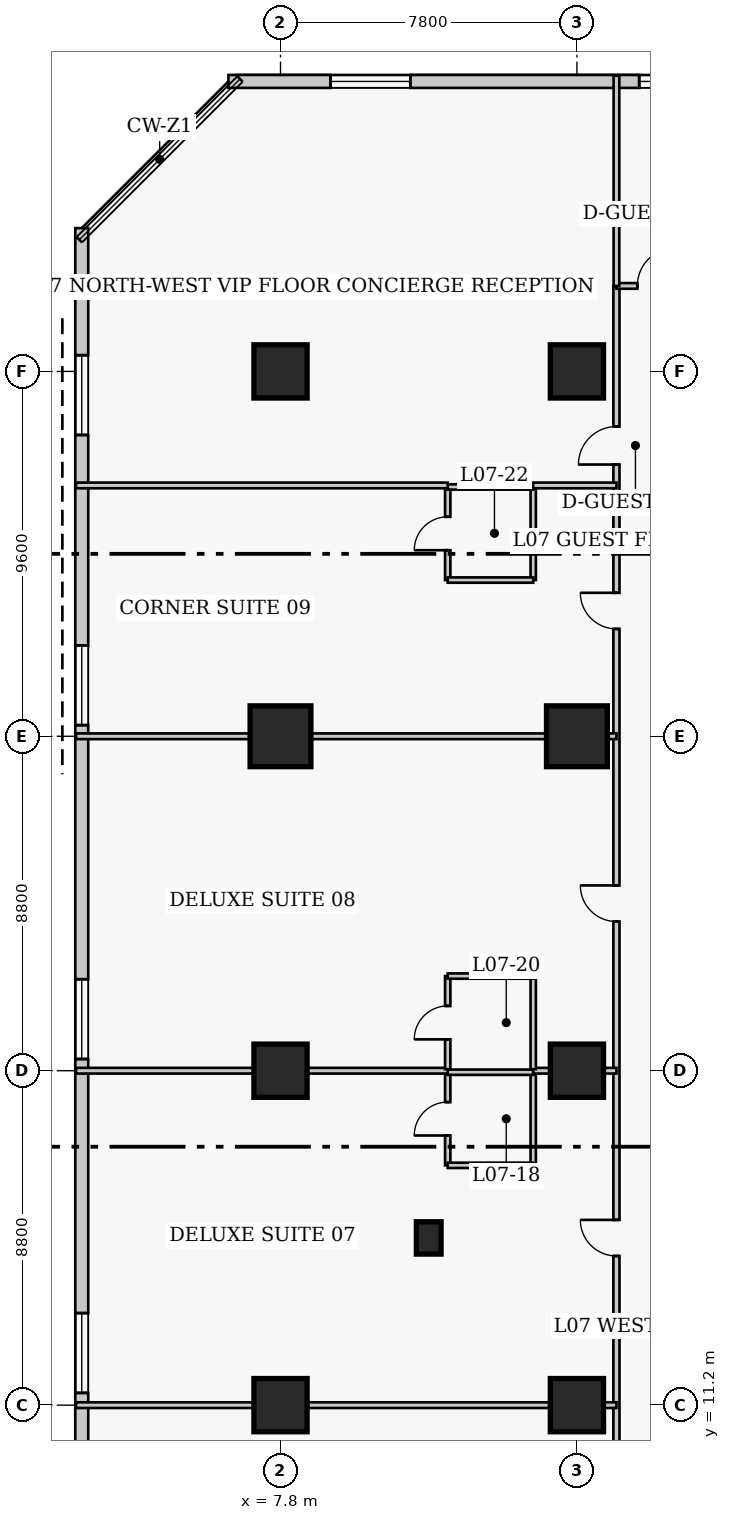
"""IFC4 building model, lengths in metres.
Left out: names, types, materials, properties, quantities, classifications, styles, units other than length and angle.
Written with IfcOpenShell. Run it as: python <this file> out.ifc"""

import sys

from ifc_helpers import new_model, si_unit, direction, frame, frame_2d, origin, origin_2d, place, context, subcontext, project, spatial, rectangle, extrude, element, fill, save


model = new_model("IFC4")
c1 = context("Model", 3, precision=1e-05, world=origin(), true_north=direction((0.0, 1.0)))
c2 = subcontext(c1, "Body", "Model", "MODEL_VIEW")
j1 = project(units=[si_unit("LENGTHUNIT", "METRE"), si_unit("PLANEANGLEUNIT", "RADIAN")], contexts=[c1])
p1 = place(None, origin())
s1 = spatial("IfcSite", under=j1, at=p1, CompositionType="ELEMENT")
p2 = place(p1, origin())
s2 = spatial("IfcBuilding", under=s1, at=p2, CompositionType="ELEMENT")
p3 = place(p2, frame((0.0, 0.0, 33.6)))
s3 = spatial("IfcBuildingStorey", under=s2, at=p3, CompositionType="ELEMENT", Elevation=33.6)
for number, where, z_axis, x_axis in (
    (1, (7.8, 11.2, 0.0), (0.0, 0.0, 1.0), (1.0, 0.0, 0.0)),
    (2, (7.8, 20.0, 0.0), (0.0, 0.0, 1.0), (1.0, 0.0, 0.0)),
):
    element("IfcColumn", number, at=place(p3, frame(where, z_axis=z_axis, x_axis=x_axis)), inside=s3, PredefinedType="COLUMN", context=c2, shape_type="SweptSolid", body=[
        extrude(rectangle(XDim=1.4, YDim=1.4, at=origin_2d()), origin(), (0.0, 0.0, 1.0), 3.8),
    ])
p4 = place(p3, frame((7.8, 28.8, 0.0), z_axis=(0.0, 0.0, 1.0), x_axis=(1.0, 0.0, 0.0)))
e3 = element("IfcColumn", 3, at=p4, inside=s3, PredefinedType="COLUMN", context=c2, shape_type="SweptSolid", body=[
    extrude(rectangle(XDim=1.6, YDim=1.6, at=origin_2d()), origin(), (0.0, 0.0, 1.0), 3.8),
])
for number, where, z_axis, x_axis in (
    (4, (7.8, 38.4, 0.0), (0.0, 0.0, 1.0), (1.0, 0.0, 0.0)),
    (5, (15.6, 11.2, 0.0), (0.0, 0.0, 1.0), (1.0, 0.0, 0.0)),
    (6, (15.6, 20.0, 0.0), (0.0, 0.0, 1.0), (1.0, 0.0, 0.0)),
):
    element("IfcColumn", number, at=place(p3, frame(where, z_axis=z_axis, x_axis=x_axis)), inside=s3, PredefinedType="COLUMN", context=c2, shape_type="SweptSolid", body=[
        extrude(rectangle(XDim=1.4, YDim=1.4, at=origin_2d()), origin(), (0.0, 0.0, 1.0), 3.8),
    ])
p5 = place(p3, frame((15.6, 28.8, 0.0), z_axis=(0.0, 0.0, 1.0), x_axis=(1.0, 0.0, 0.0)))
e7 = element("IfcColumn", 7, at=p5, inside=s3, PredefinedType="COLUMN", context=c2, shape_type="SweptSolid", body=[
    extrude(rectangle(XDim=1.6, YDim=1.6, at=origin_2d()), origin(), (0.0, 0.0, 1.0), 3.8),
])
p6 = place(p3, frame((15.6, 38.4, 0.0), z_axis=(0.0, 0.0, 1.0), x_axis=(1.0, 0.0, 0.0)))
e8 = element("IfcColumn", 8, at=p6, inside=s3, PredefinedType="COLUMN", context=c2, shape_type="SweptSolid", body=[
    extrude(rectangle(XDim=1.4, YDim=1.4, at=origin_2d()), origin(), (0.0, 0.0, 1.0), 3.8),
])
p7 = place(p3, frame((11.7, 15.6, 0.0), z_axis=(0.0, 0.0, 1.0), x_axis=(1.0, 0.0, 0.0)))
e9 = element("IfcColumn", 9, at=p7, inside=s3, PredefinedType="PILASTER", context=c2, shape_type="SweptSolid", body=[
    extrude(rectangle(XDim=0.65, YDim=0.85, at=origin_2d()), origin(), (0.0, 0.0, 1.0), 3.8),
])
p8 = place(p3, frame((36.32, 46.03, 0.0), z_axis=(0.0, 0.0, 1.0), x_axis=(-1.0, 0.0, 0.0)))
e10 = element("IfcWall", 10, at=p8, inside=s3, PredefinedType="SOLIDWALL", context=c2, shape_type="SweptSolid", body=[
    extrude(rectangle(XDim=29.89, YDim=0.34, at=frame_2d((14.945, 0.0))), origin(), (0.0, 0.0, 1.0), 3.54),
])
p9 = place(p8, frame((2.686, 0.0, 0.85)))
e11 = element("IfcOpeningElement", 11, at=p9, cuts=e10, PredefinedType="OPENING", context=c2, shape_type="SweptSolid", body=[
    extrude(rectangle(XDim=2.1, YDim=1.85, at=frame_2d((1.05, 0.925))), frame((0.0, 0.18, 0.0), z_axis=(0.0, -1.0, 0.0), x_axis=(1.0, 0.0, 0.0)), (0.0, 0.0, 1.0), 0.36),
])
p10 = place(p8, frame((10.159, 0.0, 0.85)))
e12 = element("IfcOpeningElement", 12, at=p10, cuts=e10, PredefinedType="OPENING", context=c2, shape_type="SweptSolid", body=[
    extrude(rectangle(XDim=2.1, YDim=1.85, at=frame_2d((1.05, 0.925))), frame((0.0, 0.18, 0.0), z_axis=(0.0, -1.0, 0.0), x_axis=(1.0, 0.0, 0.0)), (0.0, 0.0, 1.0), 0.36),
])
p11 = place(p8, frame((16.981, 0.0, 0.85)))
e13 = element("IfcOpeningElement", 13, at=p11, cuts=e10, PredefinedType="OPENING", context=c2, shape_type="SweptSolid", body=[
    extrude(rectangle(XDim=2.1, YDim=1.85, at=frame_2d((1.05, 0.925))), frame((0.0, 0.18, 0.0), z_axis=(0.0, -1.0, 0.0), x_axis=(1.0, 0.0, 0.0)), (0.0, 0.0, 1.0), 0.36),
])
p12 = place(p8, frame((25.104, 0.0, 0.85)))
e14 = element("IfcOpeningElement", 14, at=p12, cuts=e10, PredefinedType="OPENING", context=c2, shape_type="SweptSolid", body=[
    extrude(rectangle(XDim=2.1, YDim=1.85, at=frame_2d((1.05, 0.925))), frame((0.0, 0.18, 0.0), z_axis=(0.0, -1.0, 0.0), x_axis=(1.0, 0.0, 0.0)), (0.0, 0.0, 1.0), 0.36),
])
p13 = place(p3, frame((2.57, 42.17, 0.0), z_axis=(0.0, 0.0, 1.0), x_axis=(0.0, -1.0, 0.0)))
e15 = element("IfcWall", 15, at=p13, inside=s3, PredefinedType="SOLIDWALL", context=c2, shape_type="SweptSolid", body=[
    extrude(rectangle(XDim=35.14, YDim=0.34, at=frame_2d((17.57, 0.0))), origin(), (0.0, 0.0, 1.0), 3.54),
])
p14 = place(p13, frame((3.343, 0.0, 0.85)))
e16 = element("IfcOpeningElement", 16, at=p14, cuts=e15, PredefinedType="OPENING", context=c2, shape_type="SweptSolid", body=[
    extrude(rectangle(XDim=2.1, YDim=1.85, at=frame_2d((1.05, 0.925))), frame((0.0, 0.18, 0.0), z_axis=(0.0, -1.0, 0.0), x_axis=(1.0, 0.0, 0.0)), (0.0, 0.0, 1.0), 0.36),
])
p15 = place(p13, frame((10.978, 0.0, 0.85)))
e17 = element("IfcOpeningElement", 17, at=p15, cuts=e15, PredefinedType="OPENING", context=c2, shape_type="SweptSolid", body=[
    extrude(rectangle(XDim=2.1, YDim=1.85, at=frame_2d((1.05, 0.925))), frame((0.0, 0.18, 0.0), z_axis=(0.0, -1.0, 0.0), x_axis=(1.0, 0.0, 0.0)), (0.0, 0.0, 1.0), 0.36),
])
p16 = place(p13, frame((19.762, 0.0, 0.85)))
e18 = element("IfcOpeningElement", 18, at=p16, cuts=e15, PredefinedType="OPENING", context=c2, shape_type="SweptSolid", body=[
    extrude(rectangle(XDim=2.1, YDim=1.85, at=frame_2d((1.05, 0.925))), frame((0.0, 0.18, 0.0), z_axis=(0.0, -1.0, 0.0), x_axis=(1.0, 0.0, 0.0)), (0.0, 0.0, 1.0), 0.36),
])
p17 = place(p13, frame((28.548, 0.0, 0.85)))
e19 = element("IfcOpeningElement", 19, at=p17, cuts=e15, PredefinedType="OPENING", context=c2, shape_type="SweptSolid", body=[
    extrude(rectangle(XDim=2.1, YDim=1.85, at=frame_2d((1.05, 0.925))), frame((0.0, 0.18, 0.0), z_axis=(0.0, -1.0, 0.0), x_axis=(1.0, 0.0, 0.0)), (0.0, 0.0, 1.0), 0.36),
])
p18 = place(p3, frame((16.64, 5.05, 0.0), z_axis=(0.0, 0.0, 1.0), x_axis=(0.0, 1.0, 0.0)))
e20 = element("IfcWall", 20, at=p18, inside=s3, PredefinedType="PARTITIONING", context=c2, shape_type="SweptSolid", body=[
    extrude(rectangle(XDim=35.6, YDim=0.16, at=frame_2d((17.8, 0.0))), origin(), (0.0, 0.0, 1.0), 3.54),
])
p19 = place(p18, frame((2.6, 0.0, 0.0)))
e21 = element("IfcOpeningElement", 21, at=p19, cuts=e20, PredefinedType="OPENING", context=c2, shape_type="SweptSolid", body=[
    extrude(rectangle(XDim=0.95, YDim=2.1, at=frame_2d((0.475, 1.05))), frame((0.0, 0.09, 0.0), z_axis=(0.0, -1.0, 0.0), x_axis=(1.0, 0.0, 0.0)), (0.0, 0.0, 1.0), 0.18),
])
p20 = place(p18, frame((10.075, 0.0, 0.0)))
e22 = element("IfcOpeningElement", 22, at=p20, cuts=e20, PredefinedType="OPENING", context=c2, shape_type="SweptSolid", body=[
    extrude(rectangle(XDim=0.95, YDim=2.1, at=frame_2d((0.475, 1.05))), frame((0.0, 0.09, 0.0), z_axis=(0.0, -1.0, 0.0), x_axis=(1.0, 0.0, 0.0)), (0.0, 0.0, 1.0), 0.18),
])
p21 = place(p18, frame((18.875, 0.0, 0.0)))
e23 = element("IfcOpeningElement", 23, at=p21, cuts=e20, PredefinedType="OPENING", context=c2, shape_type="SweptSolid", body=[
    extrude(rectangle(XDim=0.95, YDim=2.1, at=frame_2d((0.475, 1.05))), frame((0.0, 0.09, 0.0), z_axis=(0.0, -1.0, 0.0), x_axis=(1.0, 0.0, 0.0)), (0.0, 0.0, 1.0), 0.18),
])
p22 = place(p18, frame((26.575, 0.0, 0.0)))
e24 = element("IfcOpeningElement", 24, at=p22, cuts=e20, PredefinedType="OPENING", context=c2, shape_type="SweptSolid", body=[
    extrude(rectangle(XDim=0.95, YDim=2.1, at=frame_2d((0.475, 1.05))), frame((0.0, 0.09, 0.0), z_axis=(0.0, -1.0, 0.0), x_axis=(1.0, 0.0, 0.0)), (0.0, 0.0, 1.0), 0.18),
])
p23 = place(p18, frame((30.9, 0.0, 0.0)))
e25 = element("IfcOpeningElement", 25, at=p23, cuts=e20, PredefinedType="OPENING", context=c2, shape_type="SweptSolid", body=[
    extrude(rectangle(XDim=1.0, YDim=2.15, at=frame_2d((0.5, 1.075))), frame((0.0, 0.09, 0.0), z_axis=(0.0, -1.0, 0.0), x_axis=(1.0, 0.0, 0.0)), (0.0, 0.0, 1.0), 0.18),
])
p24 = place(p3, frame((16.64, 40.65, 0.0), z_axis=(0.0, 0.0, 1.0), x_axis=(1.0, 0.0, 0.0)))
e26 = element("IfcWall", 26, at=p24, inside=s3, PredefinedType="PARTITIONING", context=c2, shape_type="SweptSolid", body=[
    extrude(rectangle(XDim=5.46, YDim=0.15, at=frame_2d((2.73, 0.0))), origin(), (0.0, 0.0, 1.0), 3.54),
])
p25 = place(p24, frame((0.55, 0.0, 0.0)))
e27 = element("IfcOpeningElement", 27, at=p25, cuts=e26, PredefinedType="OPENING", context=c2, shape_type="SweptSolid", body=[
    extrude(rectangle(XDim=1.0, YDim=2.15, at=frame_2d((0.5, 1.075))), frame((0.0, 0.085, 0.0), z_axis=(0.0, -1.0, 0.0), x_axis=(1.0, 0.0, 0.0)), (0.0, 0.0, 1.0), 0.17),
])
p26 = place(p3, frame((16.64, 40.65, 0.0), z_axis=(0.0, 0.0, 1.0), x_axis=(0.0, 1.0, 0.0)))
e28 = element("IfcWall", 28, at=p26, inside=s3, PredefinedType="PARTITIONING", context=c2, shape_type="SweptSolid", body=[
    extrude(rectangle(XDim=5.53, YDim=0.15, at=frame_2d((2.765, 0.0))), origin(), (0.0, 0.0, 1.0), 3.54),
])
p27 = place(p3, frame((2.42, 11.2, 0.0), z_axis=(0.0, 0.0, 1.0), x_axis=(1.0, 0.0, 0.0)))
e29 = element("IfcWall", 29, at=p27, inside=s3, PredefinedType="PARTITIONING", context=c2, shape_type="SweptSolid", body=[
    extrude(rectangle(XDim=14.22, YDim=0.15, at=frame_2d((7.11, 0.0))), origin(), (0.0, 0.0, 1.0), 2.593),
])
p28 = place(p3, frame((12.2, 17.51, 0.0), z_axis=(0.0, 0.0, 1.0), x_axis=(0.0, 1.0, 0.0)))
e30 = element("IfcWall", 30, at=p28, inside=s3, PredefinedType="PLUMBINGWALL", context=c2, shape_type="SweptSolid", body=[
    extrude(rectangle(XDim=2.45, YDim=0.14, at=frame_2d((1.225, 0.0))), origin(), (0.0, 0.0, 1.0), 3.54),
])
p29 = place(p28, frame((0.785, 0.0, 0.0)))
e31 = element("IfcOpeningElement", 31, at=p29, cuts=e30, PredefinedType="OPENING", context=c2, shape_type="SweptSolid", body=[
    extrude(rectangle(XDim=0.88, YDim=2.05, at=frame_2d((0.44, 1.025))), frame((0.0, 0.08, 0.0), z_axis=(0.0, -1.0, 0.0), x_axis=(1.0, 0.0, 0.0)), (0.0, 0.0, 1.0), 0.16),
])
p30 = place(p3, frame((14.45, 17.51, 0.0), z_axis=(0.0, 0.0, 1.0), x_axis=(0.0, 1.0, 0.0)))
e32 = element("IfcWall", 32, at=p30, inside=s3, PredefinedType="PLUMBINGWALL", context=c2, shape_type="SweptSolid", body=[
    extrude(rectangle(XDim=2.45, YDim=0.14, at=frame_2d((1.225, 0.0))), origin(), (0.0, 0.0, 1.0), 3.54),
])
p31 = place(p3, frame((12.2, 17.51, 0.0), z_axis=(0.0, 0.0, 1.0), x_axis=(1.0, 0.0, 0.0)))
e33 = element("IfcWall", 33, at=p31, inside=s3, PredefinedType="PLUMBINGWALL", context=c2, shape_type="SweptSolid", body=[
    extrude(rectangle(XDim=2.25, YDim=0.14, at=frame_2d((1.125, 0.0))), origin(), (0.0, 0.0, 1.0), 3.54),
])
p32 = place(p3, frame((12.2, 19.96, 0.0), z_axis=(0.0, 0.0, 1.0), x_axis=(1.0, 0.0, 0.0)))
e34 = element("IfcWall", 34, at=p32, inside=s3, PredefinedType="PLUMBINGWALL", context=c2, shape_type="SweptSolid", body=[
    extrude(rectangle(XDim=2.25, YDim=0.14, at=frame_2d((1.125, 0.0))), origin(), (0.0, 0.0, 1.0), 2.593),
])
p33 = place(p3, frame((2.42, 20.0, 0.0), z_axis=(0.0, 0.0, 1.0), x_axis=(1.0, 0.0, 0.0)))
e35 = element("IfcWall", 35, at=p33, inside=s3, PredefinedType="PARTITIONING", context=c2, shape_type="SweptSolid", body=[
    extrude(rectangle(XDim=9.78, YDim=0.15, at=frame_2d((4.89, 0.0))), origin(), (0.0, 0.0, 1.0), 2.593),
])
p34 = place(p3, frame((14.45, 20.0, 0.0), z_axis=(0.0, 0.0, 1.0), x_axis=(1.0, 0.0, 0.0)))
e36 = element("IfcWall", 36, at=p34, inside=s3, PredefinedType="PARTITIONING", context=c2, shape_type="SweptSolid", body=[
    extrude(rectangle(XDim=2.19, YDim=0.15, at=frame_2d((1.095, 0.0))), origin(), (0.0, 0.0, 1.0), 2.593),
])
p35 = place(p3, frame((12.2, 20.04, 0.0), z_axis=(0.0, 0.0, 1.0), x_axis=(0.0, 1.0, 0.0)))
e37 = element("IfcWall", 37, at=p35, inside=s3, PredefinedType="PLUMBINGWALL", context=c2, shape_type="SweptSolid", body=[
    extrude(rectangle(XDim=2.45, YDim=0.14, at=frame_2d((1.225, 0.0))), origin(), (0.0, 0.0, 1.0), 3.54),
])
p36 = place(p35, frame((0.785, 0.0, 0.0)))
e38 = element("IfcOpeningElement", 38, at=p36, cuts=e37, PredefinedType="OPENING", context=c2, shape_type="SweptSolid", body=[
    extrude(rectangle(XDim=0.88, YDim=2.05, at=frame_2d((0.44, 1.025))), frame((0.0, 0.08, 0.0), z_axis=(0.0, -1.0, 0.0), x_axis=(1.0, 0.0, 0.0)), (0.0, 0.0, 1.0), 0.16),
])
p37 = place(p3, frame((14.45, 20.04, 0.0), z_axis=(0.0, 0.0, 1.0), x_axis=(0.0, 1.0, 0.0)))
e39 = element("IfcWall", 39, at=p37, inside=s3, PredefinedType="PLUMBINGWALL", context=c2, shape_type="SweptSolid", body=[
    extrude(rectangle(XDim=2.45, YDim=0.14, at=frame_2d((1.225, 0.0))), origin(), (0.0, 0.0, 1.0), 3.54),
])
p38 = place(p3, frame((12.2, 22.49, 0.0), z_axis=(0.0, 0.0, 1.0), x_axis=(1.0, 0.0, 0.0)))
e40 = element("IfcWall", 40, at=p38, inside=s3, PredefinedType="PLUMBINGWALL", context=c2, shape_type="SweptSolid", body=[
    extrude(rectangle(XDim=2.25, YDim=0.14, at=frame_2d((1.125, 0.0))), origin(), (0.0, 0.0, 1.0), 3.54),
])
p39 = place(p3, frame((2.42, 28.8, 0.0), z_axis=(0.0, 0.0, 1.0), x_axis=(1.0, 0.0, 0.0)))
e41 = element("IfcWall", 41, at=p39, inside=s3, PredefinedType="PARTITIONING", context=c2, shape_type="SweptSolid", body=[
    extrude(rectangle(XDim=14.22, YDim=0.15, at=frame_2d((7.11, 0.0))), origin(), (0.0, 0.0, 1.0), 2.593),
])
p40 = place(p3, frame((12.2, 32.91, 0.0), z_axis=(0.0, 0.0, 1.0), x_axis=(0.0, 1.0, 0.0)))
e42 = element("IfcWall", 42, at=p40, inside=s3, PredefinedType="PLUMBINGWALL", context=c2, shape_type="SweptSolid", body=[
    extrude(rectangle(XDim=2.45, YDim=0.14, at=frame_2d((1.225, 0.0))), origin(), (0.0, 0.0, 1.0), 3.54),
])
p41 = place(p40, frame((0.785, 0.0, 0.0)))
e43 = element("IfcOpeningElement", 43, at=p41, cuts=e42, PredefinedType="OPENING", context=c2, shape_type="SweptSolid", body=[
    extrude(rectangle(XDim=0.88, YDim=2.05, at=frame_2d((0.44, 1.025))), frame((0.0, 0.08, 0.0), z_axis=(0.0, -1.0, 0.0), x_axis=(1.0, 0.0, 0.0)), (0.0, 0.0, 1.0), 0.16),
])
p42 = place(p3, frame((14.45, 32.91, 0.0), z_axis=(0.0, 0.0, 1.0), x_axis=(0.0, 1.0, 0.0)))
e44 = element("IfcWall", 44, at=p42, inside=s3, PredefinedType="PLUMBINGWALL", context=c2, shape_type="SweptSolid", body=[
    extrude(rectangle(XDim=2.45, YDim=0.14, at=frame_2d((1.225, 0.0))), origin(), (0.0, 0.0, 1.0), 3.54),
])
for number, where, z_axis, x_axis in (
    (45, (12.2, 32.91, 0.0), (0.0, 0.0, 1.0), (1.0, 0.0, 0.0)),
    (46, (12.2, 35.36, 0.0), (0.0, 0.0, 1.0), (1.0, 0.0, 0.0)),
):
    element("IfcWall", number, at=place(p3, frame(where, z_axis=z_axis, x_axis=x_axis)), inside=s3, PredefinedType="PLUMBINGWALL", context=c2, shape_type="SweptSolid", body=[
        extrude(rectangle(XDim=2.25, YDim=0.14, at=frame_2d((1.125, 0.0))), origin(), (0.0, 0.0, 1.0), 3.54),
    ])
p43 = place(p3, frame((2.42, 35.4, 0.0), z_axis=(0.0, 0.0, 1.0), x_axis=(1.0, 0.0, 0.0)))
e47 = element("IfcWall", 47, at=p43, inside=s3, PredefinedType="PARTITIONING", context=c2, shape_type="SweptSolid", body=[
    extrude(rectangle(XDim=9.78, YDim=0.15, at=frame_2d((4.89, 0.0))), origin(), (0.0, 0.0, 1.0), 3.54),
])
p44 = place(p3, frame((14.45, 35.4, 0.0), z_axis=(0.0, 0.0, 1.0), x_axis=(1.0, 0.0, 0.0)))
e48 = element("IfcWall", 48, at=p44, inside=s3, PredefinedType="PARTITIONING", context=c2, shape_type="SweptSolid", body=[
    extrude(rectangle(XDim=2.19, YDim=0.15, at=frame_2d((1.095, 0.0))), origin(), (0.0, 0.0, 1.0), 3.54),
])
p45 = place(p11, origin())
e49 = element("IfcWindow", 49, at=p45, inside=s3, PartitioningType="SINGLE_PANEL", PredefinedType="WINDOW", context=c2, shape_type="SweptSolid", body=[
    extrude(rectangle(XDim=2.1, YDim=1.85, at=frame_2d((1.05, 0.925))), frame((0.0, 0.03, 0.0), z_axis=(0.0, -1.0, 0.0), x_axis=(1.0, 0.0, 0.0)), (0.0, 0.0, 1.0), 0.06),
])
fill(e13, e49)
p46 = place(p12, origin())
e50 = element("IfcWindow", 50, at=p46, inside=s3, PartitioningType="SINGLE_PANEL", PredefinedType="WINDOW", context=c2, shape_type="SweptSolid", body=[
    extrude(rectangle(XDim=2.1, YDim=1.85, at=frame_2d((1.05, 0.925))), frame((0.0, 0.03, 0.0), z_axis=(0.0, -1.0, 0.0), x_axis=(1.0, 0.0, 0.0)), (0.0, 0.0, 1.0), 0.06),
])
fill(e14, e50)
p47 = place(p14, origin())
e51 = element("IfcWindow", 51, at=p47, inside=s3, PartitioningType="SINGLE_PANEL", PredefinedType="WINDOW", context=c2, shape_type="SweptSolid", body=[
    extrude(rectangle(XDim=2.1, YDim=1.85, at=frame_2d((1.05, 0.925))), frame((0.0, 0.03, 0.0), z_axis=(0.0, -1.0, 0.0), x_axis=(1.0, 0.0, 0.0)), (0.0, 0.0, 1.0), 0.06),
])
fill(e16, e51)
p48 = place(p15, origin())
e52 = element("IfcWindow", 52, at=p48, inside=s3, PartitioningType="SINGLE_PANEL", PredefinedType="WINDOW", context=c2, shape_type="SweptSolid", body=[
    extrude(rectangle(XDim=2.1, YDim=1.85, at=frame_2d((1.05, 0.925))), frame((0.0, 0.03, 0.0), z_axis=(0.0, -1.0, 0.0), x_axis=(1.0, 0.0, 0.0)), (0.0, 0.0, 1.0), 0.06),
])
fill(e17, e52)
p49 = place(p16, origin())
e53 = element("IfcWindow", 53, at=p49, inside=s3, PartitioningType="SINGLE_PANEL", PredefinedType="WINDOW", context=c2, shape_type="SweptSolid", body=[
    extrude(rectangle(XDim=2.1, YDim=1.85, at=frame_2d((1.05, 0.925))), frame((0.0, 0.03, 0.0), z_axis=(0.0, -1.0, 0.0), x_axis=(1.0, 0.0, 0.0)), (0.0, 0.0, 1.0), 0.06),
])
fill(e18, e53)
p50 = place(p17, origin())
e54 = element("IfcWindow", 54, at=p50, inside=s3, PartitioningType="SINGLE_PANEL", PredefinedType="WINDOW", context=c2, shape_type="SweptSolid", body=[
    extrude(rectangle(XDim=2.1, YDim=1.85, at=frame_2d((1.05, 0.925))), frame((0.0, 0.03, 0.0), z_axis=(0.0, -1.0, 0.0), x_axis=(1.0, 0.0, 0.0)), (0.0, 0.0, 1.0), 0.06),
])
fill(e19, e54)
p51 = place(p25, origin())
e55 = element("IfcDoor", 55, at=p51, inside=s3, OperationType="SINGLE_SWING_RIGHT", PredefinedType="DOOR", context=c2, shape_type="SweptSolid", body=[
    extrude(rectangle(XDim=1.0, YDim=2.15, at=frame_2d((0.5, 1.075))), frame((0.0, 0.025, 0.0), z_axis=(0.0, -1.0, 0.0), x_axis=(1.0, 0.0, 0.0)), (0.0, 0.0, 1.0), 0.05),
])
fill(e27, e55)
p52 = place(p29, origin())
e56 = element("IfcDoor", 56, at=p52, inside=s3, OperationType="SINGLE_SWING_LEFT", PredefinedType="DOOR", context=c2, shape_type="SweptSolid", body=[
    extrude(rectangle(XDim=0.88, YDim=2.05, at=frame_2d((0.44, 1.025))), frame((0.0, 0.025, 0.0), z_axis=(0.0, -1.0, 0.0), x_axis=(1.0, 0.0, 0.0)), (0.0, 0.0, 1.0), 0.05),
])
fill(e31, e56)
p53 = place(p20, origin())
e57 = element("IfcDoor", 57, at=p53, inside=s3, OperationType="SINGLE_SWING_RIGHT", PredefinedType="DOOR", context=c2, shape_type="SweptSolid", body=[
    extrude(rectangle(XDim=0.95, YDim=2.1, at=frame_2d((0.475, 1.05))), frame((0.0, 0.025, 0.0), z_axis=(0.0, -1.0, 0.0), x_axis=(1.0, 0.0, 0.0)), (0.0, 0.0, 1.0), 0.05),
])
fill(e22, e57)
p54 = place(p36, origin())
e58 = element("IfcDoor", 58, at=p54, inside=s3, OperationType="SINGLE_SWING_LEFT", PredefinedType="DOOR", context=c2, shape_type="SweptSolid", body=[
    extrude(rectangle(XDim=0.88, YDim=2.05, at=frame_2d((0.44, 1.025))), frame((0.0, 0.025, 0.0), z_axis=(0.0, -1.0, 0.0), x_axis=(1.0, 0.0, 0.0)), (0.0, 0.0, 1.0), 0.05),
])
fill(e38, e58)
p55 = place(p21, origin())
e59 = element("IfcDoor", 59, at=p55, inside=s3, OperationType="SINGLE_SWING_RIGHT", PredefinedType="DOOR", context=c2, shape_type="SweptSolid", body=[
    extrude(rectangle(XDim=0.95, YDim=2.1, at=frame_2d((0.475, 1.05))), frame((0.0, 0.025, 0.0), z_axis=(0.0, -1.0, 0.0), x_axis=(1.0, 0.0, 0.0)), (0.0, 0.0, 1.0), 0.05),
])
fill(e23, e59)
p56 = place(p41, origin())
e60 = element("IfcDoor", 60, at=p56, inside=s3, OperationType="SINGLE_SWING_LEFT", PredefinedType="DOOR", context=c2, shape_type="SweptSolid", body=[
    extrude(rectangle(XDim=0.88, YDim=2.05, at=frame_2d((0.44, 1.025))), frame((0.0, 0.025, 0.0), z_axis=(0.0, -1.0, 0.0), x_axis=(1.0, 0.0, 0.0)), (0.0, 0.0, 1.0), 0.05),
])
fill(e43, e60)
p57 = place(p22, origin())
e61 = element("IfcDoor", 61, at=p57, inside=s3, OperationType="SINGLE_SWING_RIGHT", PredefinedType="DOOR", context=c2, shape_type="SweptSolid", body=[
    extrude(rectangle(XDim=0.95, YDim=2.1, at=frame_2d((0.475, 1.05))), frame((0.0, 0.025, 0.0), z_axis=(0.0, -1.0, 0.0), x_axis=(1.0, 0.0, 0.0)), (0.0, 0.0, 1.0), 0.05),
])
fill(e24, e61)
p58 = place(p23, origin())
e62 = element("IfcDoor", 62, at=p58, inside=s3, OperationType="SINGLE_SWING_LEFT", PredefinedType="DOOR", context=c2, shape_type="SweptSolid", body=[
    extrude(rectangle(XDim=1.0, YDim=2.15, at=frame_2d((0.5, 1.075))), frame((0.0, 0.025, 0.0), z_axis=(0.0, -1.0, 0.0), x_axis=(1.0, 0.0, 0.0)), (0.0, 0.0, 1.0), 0.05),
])
fill(e25, e62)
save(model, sys.argv[1])
